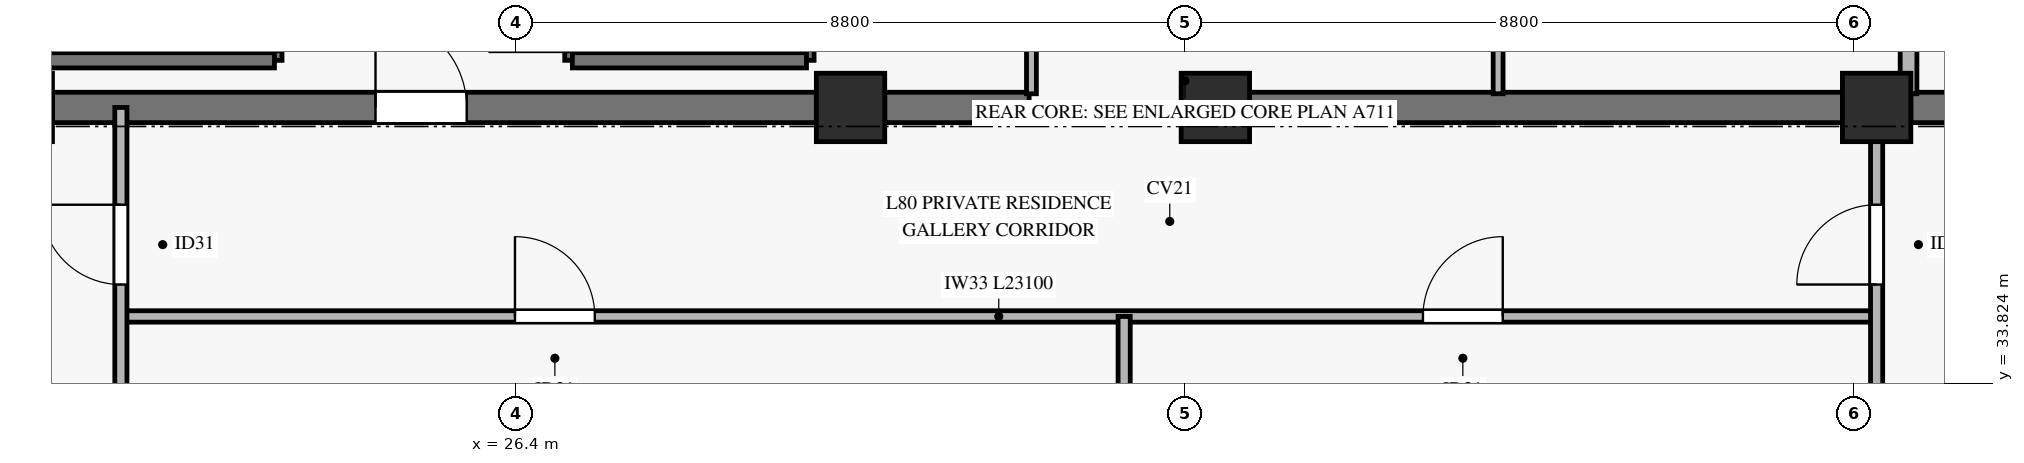
"""IFC4 building model, lengths in metres.
Left out: names, types, materials, properties, quantities, classifications, styles, units other than length and angle.
Written with IfcOpenShell. Run it as: python <this file> out.ifc"""

import sys

from ifc_helpers import new_model, si_unit, direction, frame, frame_2d, origin, origin_2d, place, context, subcontext, project, spatial, rectangle, extrude, source, transform, mapped, element, fill, save


model = new_model("IFC4")
c1 = context("Model", 3, precision=1e-05, world=origin(), true_north=direction((0.0, 1.0)))
c2 = subcontext(c1, "Body", "Model", "MODEL_VIEW")
j1 = project(units=[si_unit("LENGTHUNIT", "METRE"), si_unit("PLANEANGLEUNIT", "RADIAN")], contexts=[c1])
p1 = place(None, origin())
s1 = spatial("IfcSite", under=j1, at=p1, CompositionType="ELEMENT")
p2 = place(p1, origin())
s2 = spatial("IfcBuilding", under=s1, at=p2, CompositionType="ELEMENT")
p3 = place(p2, frame((0.0, 0.0, 310.8)))
s3 = spatial("IfcBuildingStorey", under=s2, at=p3, CompositionType="ELEMENT", Elevation=310.8)
m1 = source(origin(), c2, "Body", "SweptSolid", [
    extrude(rectangle(XDim=0.9, YDim=0.9, at=origin_2d()), origin(), (0.0, 0.0, 1.0), 3.185),
])
for number, where, z_axis, x_axis in (
    (1, (30.8, 37.45, 0.0), (0.0, 0.0, 1.0), (1.0, 0.0, 0.0)),
    (2, (35.6, 37.45, 0.0), (0.0, 0.0, 1.0), (1.0, 0.0, 0.0)),
    (3, (44.3, 37.45, 0.0), (0.0, 0.0, 1.0), (1.0, 0.0, 0.0)),
):
    element("IfcColumn", number, at=place(p3, frame(where, z_axis=z_axis, x_axis=x_axis)), inside=s3, PredefinedType="PILASTER", context=c2, shape_type="MappedRepresentation", body=[
        mapped(m1, transform((0.0, 0.0, 0.0), x_axis=(1.0, 0.0, 0.0), y_axis=(0.0, 1.0, 0.0), z_axis=(0.0, 0.0, 1.0), scale=1.0)),
    ])
p4 = place(p3, frame((20.3, 37.45, 0.0), z_axis=(0.0, 0.0, 1.0), x_axis=(1.0, 0.0, 0.0)))
e4 = element("IfcWall", 4, at=p4, inside=s3, PredefinedType="SHEAR", context=c2, shape_type="SweptSolid", body=[
    extrude(rectangle(XDim=10.05, YDim=0.4, at=frame_2d((5.025, 0.0))), origin(), (0.0, 0.0, 1.0), 3.185),
])
p5 = place(p4, frame((4.25, 0.0, 0.0)))
e5 = element("IfcOpeningElement", 5, at=p5, cuts=e4, PredefinedType="OPENING", context=c2, shape_type="SweptSolid", body=[
    extrude(rectangle(XDim=1.2, YDim=2.15, at=frame_2d((0.6, 1.075))), frame((0.0, 0.21, 0.0), z_axis=(0.0, -1.0, 0.0), x_axis=(1.0, 0.0, 0.0)), (0.0, 0.0, 1.0), 0.42),
])
p6 = place(p3, frame((31.25, 37.45, 0.0), z_axis=(0.0, 0.0, 1.0), x_axis=(1.0, 0.0, 0.0)))
e6 = element("IfcWall", 6, at=p6, inside=s3, PredefinedType="SHEAR", context=c2, shape_type="SweptSolid", body=[
    extrude(rectangle(XDim=1.9, YDim=0.4, at=frame_2d((0.95, 0.0))), origin(), (0.0, 0.0, 1.0), 3.185),
])
p7 = place(p3, frame((36.05, 37.45, 0.0), z_axis=(0.0, 0.0, 1.0), x_axis=(1.0, 0.0, 0.0)))
e7 = element("IfcWall", 7, at=p7, inside=s3, PredefinedType="SHEAR", context=c2, shape_type="SweptSolid", body=[
    extrude(rectangle(XDim=7.8, YDim=0.4, at=frame_2d((3.9, 0.0))), origin(), (0.0, 0.0, 1.0), 3.185),
])
p8 = place(p3, frame((44.75, 37.45, 0.0), z_axis=(0.0, 0.0, 1.0), x_axis=(1.0, 0.0, 0.0)))
e8 = element("IfcWall", 8, at=p8, inside=s3, PredefinedType="SHEAR", context=c2, shape_type="SweptSolid", body=[
    extrude(rectangle(XDim=5.35, YDim=0.4, at=frame_2d((2.675, 0.0))), origin(), (0.0, 0.0, 1.0), 3.185),
])
p9 = place(p8, frame((0.7, 0.0, 0.0)))
e9 = element("IfcOpeningElement", 9, at=p9, cuts=e8, PredefinedType="OPENING", context=c2, shape_type="SweptSolid", body=[
    extrude(rectangle(XDim=1.2, YDim=2.15, at=frame_2d((0.6, 1.075))), frame((0.0, 0.21, 0.0), z_axis=(0.0, -1.0, 0.0), x_axis=(1.0, 0.0, 0.0)), (0.0, 0.0, 1.0), 0.42),
])
p10 = place(p3, frame((23.22, 38.07, 0.0), z_axis=(0.0, 0.0, 1.0), x_axis=(0.0, 1.0, 0.0)))
e10 = element("IfcWall", 10, at=p10, inside=s3, PredefinedType="SOLIDWALL", context=c2, shape_type="SweptSolid", body=[
    extrude(rectangle(XDim=7.25, YDim=0.2, at=frame_2d((3.625, 0.0))), origin(), (0.0, 0.0, 1.0), 3.4),
])
p11 = place(p10, frame((0.11, 0.0, 0.0)))
e11 = element("IfcOpeningElement", 11, at=p11, cuts=e10, PredefinedType="OPENING", context=c2, shape_type="SweptSolid", body=[
    extrude(rectangle(XDim=1.1, YDim=2.15, at=frame_2d((0.55, 1.075))), frame((0.0, 0.11, 0.0), z_axis=(0.0, -1.0, 0.0), x_axis=(1.0, 0.0, 0.0)), (0.0, 0.0, 1.0), 0.22),
])
p12 = place(p3, frame((20.17, 38.07, 0.0), z_axis=(0.0, 0.0, 1.0), x_axis=(1.0, 0.0, 0.0)))
e12 = element("IfcWall", 12, at=p12, inside=s3, PredefinedType="SOLIDWALL", context=c2, shape_type="SweptSolid", body=[
    extrude(rectangle(XDim=3.05, YDim=0.2, at=frame_2d((1.525, 0.0))), origin(), (0.0, 0.0, 1.0), 3.4),
])
p13 = place(p3, frame((27.14, 38.07, 0.0), z_axis=(0.0, 0.0, 1.0), x_axis=(0.0, 1.0, 0.0)))
e13 = element("IfcWall", 13, at=p13, inside=s3, PredefinedType="SOLIDWALL", context=c2, shape_type="SweptSolid", body=[
    extrude(rectangle(XDim=7.25, YDim=0.2, at=frame_2d((3.625, 0.0))), origin(), (0.0, 0.0, 1.0), 3.4),
])
p14 = place(p13, frame((0.11, 0.0, 0.0)))
e14 = element("IfcOpeningElement", 14, at=p14, cuts=e13, PredefinedType="OPENING", context=c2, shape_type="SweptSolid", body=[
    extrude(rectangle(XDim=1.1, YDim=2.15, at=frame_2d((0.55, 1.075))), frame((0.0, 0.11, 0.0), z_axis=(0.0, -1.0, 0.0), x_axis=(1.0, 0.0, 0.0)), (0.0, 0.0, 1.0), 0.22),
])
p15 = place(p3, frame((30.22, 38.07, 0.0), z_axis=(0.0, 0.0, 1.0), x_axis=(0.0, 1.0, 0.0)))
e15 = element("IfcWall", 15, at=p15, inside=s3, PredefinedType="SOLIDWALL", context=c2, shape_type="SweptSolid", body=[
    extrude(rectangle(XDim=7.25, YDim=0.2, at=frame_2d((3.625, 0.0))), origin(), (0.0, 0.0, 1.0), 3.4),
])
p16 = place(p3, frame((27.14, 38.07, 0.0), z_axis=(0.0, 0.0, 1.0), x_axis=(1.0, 0.0, 0.0)))
e16 = element("IfcWall", 16, at=p16, inside=s3, PredefinedType="SOLIDWALL", context=c2, shape_type="SweptSolid", body=[
    extrude(rectangle(XDim=3.08, YDim=0.2, at=frame_2d((1.54, 0.0))), origin(), (0.0, 0.0, 1.0), 3.4),
])
p17 = place(p3, frame((44.72, 37.63, 0.0), z_axis=(0.0, 0.0, 1.0), x_axis=(0.0, 1.0, 0.0)))
e17 = element("IfcWall", 17, at=p17, inside=s3, PredefinedType="SOLIDWALL", context=c2, shape_type="SweptSolid", body=[
    extrude(rectangle(XDim=7.59, YDim=0.22, at=frame_2d((3.795, 0.0))), origin(), (0.0, 0.0, 1.0), 3.185),
])
p18 = place(p3, frame((33.18, 37.63, 0.0), z_axis=(0.0, 0.0, 1.0), x_axis=(0.0, 1.0, 0.0)))
e18 = element("IfcWall", 18, at=p18, inside=s3, PredefinedType="PARTITIONING", context=c2, shape_type="SweptSolid", body=[
    extrude(rectangle(XDim=6.52, YDim=0.13, at=frame_2d((3.26, 0.0))), origin(), (0.0, 0.0, 1.0), 2.27),
])
p19 = place(p18, frame((1.32, 0.0, 0.0)))
e19 = element("IfcOpeningElement", 19, at=p19, cuts=e18, PredefinedType="OPENING", context=c2, shape_type="SweptSolid", body=[
    extrude(rectangle(XDim=0.9, YDim=2.1, at=frame_2d((0.45, 1.05))), frame((0.0, 0.075, 0.0), z_axis=(0.0, -1.0, 0.0), x_axis=(1.0, 0.0, 0.0)), (0.0, 0.0, 1.0), 0.15),
])
p20 = place(p18, frame((4.62, 0.0, 0.0)))
e20 = element("IfcOpeningElement", 20, at=p20, cuts=e18, PredefinedType="OPENING", context=c2, shape_type="SweptSolid", body=[
    extrude(rectangle(XDim=0.9, YDim=2.1, at=frame_2d((0.45, 1.05))), frame((0.0, 0.075, 0.0), z_axis=(0.0, -1.0, 0.0), x_axis=(1.0, 0.0, 0.0)), (0.0, 0.0, 1.0), 0.15),
])
p21 = place(p3, frame((39.32, 37.63, 0.0), z_axis=(0.0, 0.0, 1.0), x_axis=(0.0, 1.0, 0.0)))
e21 = element("IfcWall", 21, at=p21, inside=s3, PredefinedType="PARTITIONING", context=c2, shape_type="SweptSolid", body=[
    extrude(rectangle(XDim=8.74, YDim=0.13, at=frame_2d((4.37, 0.0))), origin(), (0.0, 0.0, 1.0), 3.185),
])
p22 = place(p21, frame((4.89, 0.0, 0.0)))
e22 = element("IfcOpeningElement", 22, at=p22, cuts=e21, PredefinedType="OPENING", context=c2, shape_type="SweptSolid", body=[
    extrude(rectangle(XDim=0.9, YDim=2.1, at=frame_2d((0.45, 1.05))), frame((0.0, 0.075, 0.0), z_axis=(0.0, -1.0, 0.0), x_axis=(1.0, 0.0, 0.0)), (0.0, 0.0, 1.0), 0.15),
])
p23 = place(p3, frame((21.2, 34.7, 0.0), z_axis=(0.0, 0.0, 1.0), x_axis=(1.0, 0.0, 0.0)))
e23 = element("IfcWall", 23, at=p23, inside=s3, PredefinedType="PARTITIONING", context=c2, shape_type="SweptSolid", body=[
    extrude(rectangle(XDim=23.1, YDim=0.15, at=frame_2d((11.55, 0.0))), origin(), (0.0, 0.0, 1.0), 2.47),
])
p24 = place(p23, frame((5.185, 0.0, 0.0)))
e24 = element("IfcOpeningElement", 24, at=p24, cuts=e23, PredefinedType="OPENING", context=c2, shape_type="SweptSolid", body=[
    extrude(rectangle(XDim=1.05, YDim=2.15, at=frame_2d((0.525, 1.075))), frame((0.0, 0.085, 0.0), z_axis=(0.0, -1.0, 0.0), x_axis=(1.0, 0.0, 0.0)), (0.0, 0.0, 1.0), 0.17),
])
p25 = place(p23, frame((17.131, 0.0, 0.0)))
e25 = element("IfcOpeningElement", 25, at=p25, cuts=e23, PredefinedType="OPENING", context=c2, shape_type="SweptSolid", body=[
    extrude(rectangle(XDim=1.05, YDim=2.15, at=frame_2d((0.525, 1.075))), frame((0.0, 0.085, 0.0), z_axis=(0.0, -1.0, 0.0), x_axis=(1.0, 0.0, 0.0)), (0.0, 0.0, 1.0), 0.17),
])
p26 = place(p3, frame((21.2, 19.772, 0.0), z_axis=(0.0, 0.0, 1.0), x_axis=(0.0, 1.0, 0.0)))
e26 = element("IfcWall", 26, at=p26, inside=s3, PredefinedType="PARTITIONING", context=c2, shape_type="SweptSolid", body=[
    extrude(rectangle(XDim=17.678, YDim=0.16, at=frame_2d((8.839, 0.0))), origin(), (0.0, 0.0, 1.0), 2.77),
])
p27 = place(p26, frame((15.348, 0.0, 0.0)))
e27 = element("IfcOpeningElement", 27, at=p27, cuts=e26, PredefinedType="OPENING", context=c2, shape_type="SweptSolid", body=[
    extrude(rectangle(XDim=1.05, YDim=2.15, at=frame_2d((0.525, 1.075))), frame((0.0, 0.09, 0.0), z_axis=(0.0, -1.0, 0.0), x_axis=(1.0, 0.0, 0.0)), (0.0, 0.0, 1.0), 0.18),
])
p28 = place(p3, frame((34.4, 19.772, 0.0), z_axis=(0.0, 0.0, 1.0), x_axis=(0.0, 1.0, 0.0)))
e28 = element("IfcWall", 28, at=p28, inside=s3, PredefinedType="PARTITIONING", context=c2, shape_type="SweptSolid", body=[
    extrude(rectangle(XDim=14.928, YDim=0.16, at=frame_2d((7.464, 0.0))), origin(), (0.0, 0.0, 1.0), 2.77),
])
p29 = place(p3, frame((44.3, 19.772, 0.0), z_axis=(0.0, 0.0, 1.0), x_axis=(0.0, 1.0, 0.0)))
e29 = element("IfcWall", 29, at=p29, inside=s3, PredefinedType="PARTITIONING", context=c2, shape_type="SweptSolid", body=[
    extrude(rectangle(XDim=17.678, YDim=0.16, at=frame_2d((8.839, 0.0))), origin(), (0.0, 0.0, 1.0), 2.47),
])
p30 = place(p29, frame((15.348, 0.0, 0.0)))
e30 = element("IfcOpeningElement", 30, at=p30, cuts=e29, PredefinedType="OPENING", context=c2, shape_type="SweptSolid", body=[
    extrude(rectangle(XDim=1.05, YDim=2.15, at=frame_2d((0.525, 1.075))), frame((0.0, 0.09, 0.0), z_axis=(0.0, -1.0, 0.0), x_axis=(1.0, 0.0, 0.0)), (0.0, 0.0, 1.0), 0.18),
])
m2 = source(origin(), c2, "Body", "SweptSolid", [
    extrude(rectangle(XDim=1.2, YDim=2.15, at=frame_2d((0.6, 1.075))), frame((0.0, 0.025, 0.0), z_axis=(0.0, -1.0, 0.0), x_axis=(1.0, 0.0, 0.0)), (0.0, 0.0, 1.0), 0.05),
])
p31 = place(p5, origin())
e31 = element("IfcDoor", 31, at=p31, inside=s3, OperationType="SINGLE_SWING_LEFT", PredefinedType="DOOR", context=c2, shape_type="MappedRepresentation", body=[
    mapped(m2, transform((0.0, 0.0, 0.0), x_axis=(1.0, 0.0, 0.0), y_axis=(0.0, 1.0, 0.0), z_axis=(0.0, 0.0, 1.0), scale=1.0)),
])
fill(e5, e31)
m3 = source(origin(), c2, "Body", "SweptSolid", [
    extrude(rectangle(XDim=1.05, YDim=2.15, at=frame_2d((0.525, 1.075))), frame((0.0, 0.025, 0.0), z_axis=(0.0, -1.0, 0.0), x_axis=(1.0, 0.0, 0.0)), (0.0, 0.0, 1.0), 0.05),
])
p32 = place(p27, origin())
e32 = element("IfcDoor", 32, at=p32, inside=s3, OperationType="SINGLE_SWING_RIGHT", PredefinedType="DOOR", context=c2, shape_type="MappedRepresentation", body=[
    mapped(m3, transform((0.0, 0.0, 0.0), x_axis=(1.0, 0.0, 0.0), y_axis=(0.0, 1.0, 0.0), z_axis=(0.0, 0.0, 1.0), scale=1.0)),
])
fill(e27, e32)
p33 = place(p24, origin())
e33 = element("IfcDoor", 33, at=p33, inside=s3, OperationType="SINGLE_SWING_LEFT", PredefinedType="DOOR", context=c2, shape_type="MappedRepresentation", body=[
    mapped(m3, transform((0.0, 0.0, 0.0), x_axis=(1.0, 0.0, 0.0), y_axis=(0.0, 1.0, 0.0), z_axis=(0.0, 0.0, 1.0), scale=1.0)),
])
fill(e24, e33)
p34 = place(p25, origin())
e34 = element("IfcDoor", 34, at=p34, inside=s3, OperationType="SINGLE_SWING_RIGHT", PredefinedType="DOOR", context=c2, shape_type="MappedRepresentation", body=[
    mapped(m3, transform((0.0, 0.0, 0.0), x_axis=(1.0, 0.0, 0.0), y_axis=(0.0, 1.0, 0.0), z_axis=(0.0, 0.0, 1.0), scale=1.0)),
])
fill(e25, e34)
p35 = place(p30, origin())
e35 = element("IfcDoor", 35, at=p35, inside=s3, OperationType="SINGLE_SWING_LEFT", PredefinedType="DOOR", context=c2, shape_type="MappedRepresentation", body=[
    mapped(m3, transform((0.0, 0.0, 0.0), x_axis=(1.0, 0.0, 0.0), y_axis=(0.0, 1.0, 0.0), z_axis=(0.0, 0.0, 1.0), scale=1.0)),
])
fill(e30, e35)
save(model, sys.argv[1])
